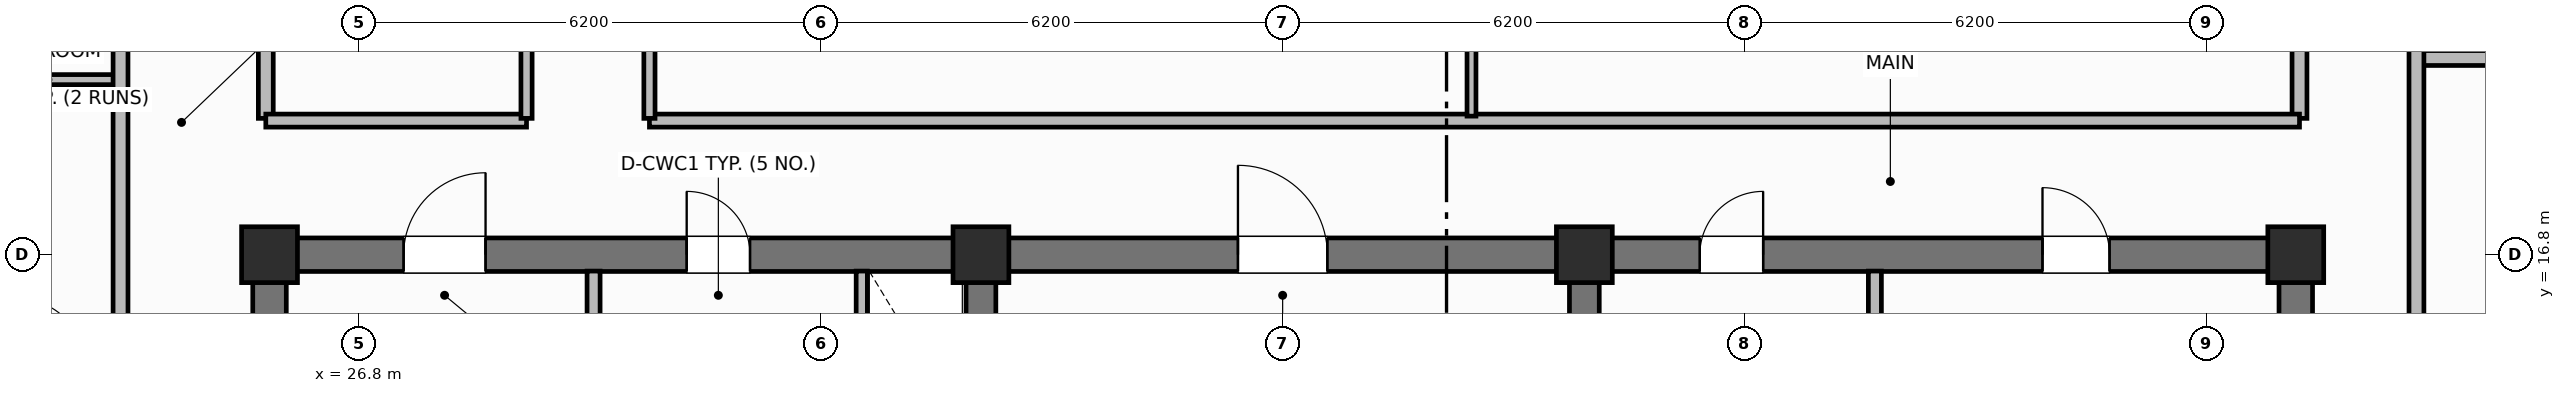
"""IFC4 building model, lengths in metres.
Left out: names, types, materials, properties, quantities, classifications, styles, units other than length and angle.
Written with IfcOpenShell. Run it as: python <this file> out.ifc"""

import sys

from ifc_helpers import new_model, si_unit, direction, frame, frame_2d, origin, origin_2d, place, context, subcontext, project, spatial, rectangle, extrude, element, fill, save


model = new_model("IFC4")
c1 = context("Model", 3, precision=1e-05, world=origin(), true_north=direction((0.0, 1.0)))
c2 = subcontext(c1, "Body", "Model", "MODEL_VIEW")
j1 = project(units=[si_unit("LENGTHUNIT", "METRE"), si_unit("PLANEANGLEUNIT", "RADIAN")], contexts=[c1])
p1 = place(None, origin())
s1 = spatial("IfcSite", under=j1, at=p1, CompositionType="ELEMENT")
p2 = place(p1, origin())
s2 = spatial("IfcBuilding", under=s1, at=p2, CompositionType="ELEMENT")
p3 = place(p2, frame((0.0, 0.0, 275.0)))
s3 = spatial("IfcBuildingStorey", under=s2, at=p3, CompositionType="ELEMENT", Elevation=275.0)
for number, where, z_axis, x_axis in (
    (1, (25.6, 10.825, 0.0), (0.0, 0.0, 1.0), (0.0, 1.0, 0.0)),
    (2, (52.8, 10.825, 0.0), (0.0, 0.0, 1.0), (0.0, 1.0, 0.0)),
):
    element("IfcWall", number, at=place(p3, frame(where, z_axis=z_axis, x_axis=x_axis)), inside=s3, PredefinedType="SHEAR", context=c2, shape_type="SweptSolid", body=[
        extrude(rectangle(XDim=5.75, YDim=0.45, at=frame_2d((2.875, 0.0))), origin(), (0.0, 0.0, 1.0), 3.7),
    ])
p4 = place(p3, frame((25.6, 16.8, 0.0), z_axis=(0.0, 0.0, 1.0), x_axis=(1.0, 0.0, 0.0)))
e3 = element("IfcWall", 3, at=p4, inside=s3, PredefinedType="SHEAR", context=c2, shape_type="SweptSolid", body=[
    extrude(rectangle(XDim=27.2, YDim=0.45, at=frame_2d((13.6, 0.0))), origin(), (0.0, 0.0, 1.0), 3.7),
])
p5 = place(p4, frame((1.8, 0.0, 0.0)))
e4 = element("IfcOpeningElement", 4, at=p5, cuts=e3, PredefinedType="OPENING", context=c2, shape_type="SweptSolid", body=[
    extrude(rectangle(XDim=1.1, YDim=2.15, at=frame_2d((0.55, 1.075))), frame((0.0, 0.235, 0.0), z_axis=(0.0, -1.0, 0.0), x_axis=(1.0, 0.0, 0.0)), (0.0, 0.0, 1.0), 0.47),
])
p6 = place(p4, frame((5.6, 0.0, 0.0)))
e5 = element("IfcOpeningElement", 5, at=p6, cuts=e3, PredefinedType="OPENING", context=c2, shape_type="SweptSolid", body=[
    extrude(rectangle(XDim=0.85, YDim=2.1, at=frame_2d((0.425, 1.05))), frame((0.0, 0.235, 0.0), z_axis=(0.0, -1.0, 0.0), x_axis=(1.0, 0.0, 0.0)), (0.0, 0.0, 1.0), 0.47),
])
p7 = place(p4, frame((13.0, 0.0, 0.0)))
e6 = element("IfcOpeningElement", 6, at=p7, cuts=e3, PredefinedType="OPENING", context=c2, shape_type="SweptSolid", body=[
    extrude(rectangle(XDim=1.2, YDim=2.15, at=frame_2d((0.6, 1.075))), frame((0.0, 0.235, 0.0), z_axis=(0.0, -1.0, 0.0), x_axis=(1.0, 0.0, 0.0)), (0.0, 0.0, 1.0), 0.47),
])
p8 = place(p4, frame((19.2, 0.0, 0.0)))
e7 = element("IfcOpeningElement", 7, at=p8, cuts=e3, PredefinedType="OPENING", context=c2, shape_type="SweptSolid", body=[
    extrude(rectangle(XDim=0.85, YDim=2.1, at=frame_2d((0.425, 1.05))), frame((0.0, 0.235, 0.0), z_axis=(0.0, -1.0, 0.0), x_axis=(1.0, 0.0, 0.0)), (0.0, 0.0, 1.0), 0.47),
])
p9 = place(p4, frame((23.8, 0.0, 0.0)))
e8 = element("IfcOpeningElement", 8, at=p9, cuts=e3, PredefinedType="OPENING", context=c2, shape_type="SweptSolid", body=[
    extrude(rectangle(XDim=0.9, YDim=2.1, at=frame_2d((0.45, 1.05))), frame((0.0, 0.235, 0.0), z_axis=(0.0, -1.0, 0.0), x_axis=(1.0, 0.0, 0.0)), (0.0, 0.0, 1.0), 0.47),
])
for number, where, z_axis, x_axis in (
    (9, (35.15, 10.825, 0.0), (0.0, 0.0, 1.0), (0.0, 1.0, 0.0)),
    (10, (43.25, 10.825, 0.0), (0.0, 0.0, 1.0), (0.0, 1.0, 0.0)),
):
    element("IfcWall", number, at=place(p3, frame(where, z_axis=z_axis, x_axis=x_axis)), inside=s3, PredefinedType="SHEAR", context=c2, shape_type="SweptSolid", body=[
        extrude(rectangle(XDim=5.75, YDim=0.4, at=frame_2d((2.875, 0.0))), origin(), (0.0, 0.0, 1.0), 3.7),
    ])
for number, where, z_axis, x_axis in (
    (11, (25.6, 16.8, 0.0), (0.0, 0.0, 1.0), (1.0, 0.0, 0.0)),
    (12, (35.15, 16.8, 0.0), (0.0, 0.0, 1.0), (1.0, 0.0, 0.0)),
    (13, (43.25, 16.8, 0.0), (0.0, 0.0, 1.0), (1.0, 0.0, 0.0)),
    (14, (52.8, 16.8, 0.0), (0.0, 0.0, 1.0), (1.0, 0.0, 0.0)),
):
    element("IfcColumn", number, at=place(p3, frame(where, z_axis=z_axis, x_axis=x_axis)), inside=s3, PredefinedType="COLUMN", context=c2, shape_type="SweptSolid", body=[
        extrude(rectangle(XDim=0.75, YDim=0.75, at=origin_2d()), origin(), (0.0, 0.0, 1.0), 3.7),
    ])
p10 = place(p3, frame((29.95, 14.5, 0.0), z_axis=(0.0, 0.0, 1.0), x_axis=(0.0, 1.0, 0.0)))
e15 = element("IfcWall", 15, at=p10, inside=s3, PredefinedType="PARTITIONING", context=c2, shape_type="SweptSolid", body=[
    extrude(rectangle(XDim=2.08, YDim=0.175, at=frame_2d((1.04, 0.0))), origin(), (0.0, 0.0, 1.0), 2.56),
])
p11 = place(p3, frame((33.55, 14.5, 0.0), z_axis=(0.0, 0.0, 1.0), x_axis=(0.0, 1.0, 0.0)))
e16 = element("IfcWall", 16, at=p11, inside=s3, PredefinedType="PARTITIONING", context=c2, shape_type="SweptSolid", body=[
    extrude(rectangle(XDim=2.08, YDim=0.15, at=frame_2d((1.04, 0.0))), origin(), (0.0, 0.0, 1.0), 2.56),
])
p12 = place(p11, frame((0.55, 0.0, 0.0)))
e17 = element("IfcOpeningElement", 17, at=p12, cuts=e16, PredefinedType="OPENING", context=c2, shape_type="SweptSolid", body=[
    extrude(rectangle(XDim=0.85, YDim=2.05, at=frame_2d((0.425, 1.025))), frame((0.0, 0.085, 0.0), z_axis=(0.0, -1.0, 0.0), x_axis=(1.0, 0.0, 0.0)), (0.0, 0.0, 1.0), 0.17),
])
p13 = place(p3, frame((47.15, 10.95, 0.0), z_axis=(0.0, 0.0, 1.0), x_axis=(0.0, 1.0, 0.0)))
e18 = element("IfcWall", 18, at=p13, inside=s3, PredefinedType="PARTITIONING", context=c2, shape_type="SweptSolid", body=[
    extrude(rectangle(XDim=5.63, YDim=0.175, at=frame_2d((2.815, 0.0))), origin(), (0.0, 0.0, 1.0), 2.56),
])
for number, where, z_axis, x_axis in (
    (19, (25.55, 18.63, 0.0), (0.0, 0.0, 1.0), (0.0, 1.0, 0.0)),
    (20, (52.85, 18.63, 0.0), (0.0, 0.0, 1.0), (0.0, 1.0, 0.0)),
):
    element("IfcWall", number, at=place(p3, frame(where, z_axis=z_axis, x_axis=x_axis)), inside=s3, PredefinedType="PARTITIONING", context=c2, shape_type="SweptSolid", body=[
        extrude(rectangle(XDim=19.14, YDim=0.2, at=frame_2d((9.57, 0.0))), origin(), (0.0, 0.0, 1.0), 2.56),
    ])
p14 = place(p3, frame((25.55, 18.6, 0.0), z_axis=(0.0, 0.0, 1.0), x_axis=(1.0, 0.0, 0.0)))
e21 = element("IfcWall", 21, at=p14, inside=s3, PredefinedType="PARTITIONING", context=c2, shape_type="SweptSolid", body=[
    extrude(rectangle(XDim=3.5, YDim=0.175, at=frame_2d((1.75, 0.0))), origin(), (0.0, 0.0, 1.0), 2.56),
])
p15 = place(p3, frame((30.7, 18.6, 0.0), z_axis=(0.0, 0.0, 1.0), x_axis=(1.0, 0.0, 0.0)))
e22 = element("IfcWall", 22, at=p15, inside=s3, PredefinedType="PARTITIONING", context=c2, shape_type="SweptSolid", body=[
    extrude(rectangle(XDim=22.15, YDim=0.175, at=frame_2d((11.075, 0.0))), origin(), (0.0, 0.0, 1.0), 2.56),
])
p16 = place(p3, frame((41.735, 18.66, 0.0), z_axis=(0.0, 0.0, 1.0), x_axis=(0.0, 1.0, 0.0)))
e23 = element("IfcWall", 23, at=p16, inside=s3, PredefinedType="PARTITIONING", context=c2, shape_type="SweptSolid", body=[
    extrude(rectangle(XDim=10.648, YDim=0.12, at=frame_2d((5.324, 0.0))), origin(), (0.0, 0.0, 1.0), 2.56),
])
p17 = place(p16, frame((2.0, 0.0, 0.0)))
e24 = element("IfcOpeningElement", 24, at=p17, cuts=e23, PredefinedType="OPENING", context=c2, shape_type="SweptSolid", body=[
    extrude(rectangle(XDim=0.9, YDim=2.1, at=frame_2d((0.45, 1.05))), frame((0.0, 0.07, 0.0), z_axis=(0.0, -1.0, 0.0), x_axis=(1.0, 0.0, 0.0)), (0.0, 0.0, 1.0), 0.14),
])
p18 = place(p3, frame((29.05, 18.63, 0.0), z_axis=(0.0, 0.0, 1.0), x_axis=(0.0, 1.0, 0.0)))
e25 = element("IfcWall", 25, at=p18, inside=s3, PredefinedType="PARTITIONING", context=c2, shape_type="SweptSolid", body=[
    extrude(rectangle(XDim=19.14, YDim=0.15, at=frame_2d((9.57, 0.0))), origin(), (0.0, 0.0, 1.0), 2.56),
])
p19 = place(p18, frame((5.5, 0.0, 0.0)))
e26 = element("IfcOpeningElement", 26, at=p19, cuts=e25, PredefinedType="OPENING", context=c2, shape_type="SweptSolid", body=[
    extrude(rectangle(XDim=1.0, YDim=2.15, at=frame_2d((0.5, 1.075))), frame((0.0, 0.085, 0.0), z_axis=(0.0, -1.0, 0.0), x_axis=(1.0, 0.0, 0.0)), (0.0, 0.0, 1.0), 0.17),
])
p20 = place(p3, frame((30.7, 18.63, 0.0), z_axis=(0.0, 0.0, 1.0), x_axis=(0.0, 1.0, 0.0)))
e27 = element("IfcWall", 27, at=p20, inside=s3, PredefinedType="PARTITIONING", context=c2, shape_type="SweptSolid", body=[
    extrude(rectangle(XDim=19.14, YDim=0.15, at=frame_2d((9.57, 0.0))), origin(), (0.0, 0.0, 1.0), 2.56),
])
p21 = place(p20, frame((2.2, 0.0, 0.0)))
e28 = element("IfcOpeningElement", 28, at=p21, cuts=e27, PredefinedType="OPENING", context=c2, shape_type="SweptSolid", body=[
    extrude(rectangle(XDim=1.0, YDim=2.15, at=frame_2d((0.5, 1.075))), frame((0.0, 0.085, 0.0), z_axis=(0.0, -1.0, 0.0), x_axis=(1.0, 0.0, 0.0)), (0.0, 0.0, 1.0), 0.17),
])
p22 = place(p20, frame((12.719, 0.0, 0.0)))
e29 = element("IfcOpeningElement", 29, at=p22, cuts=e27, PredefinedType="OPENING", context=c2, shape_type="SweptSolid", body=[
    extrude(rectangle(XDim=1.0, YDim=2.15, at=frame_2d((0.5, 1.075))), frame((0.0, 0.085, 0.0), z_axis=(0.0, -1.0, 0.0), x_axis=(1.0, 0.0, 0.0)), (0.0, 0.0, 1.0), 0.17),
])
p23 = place(p3, frame((21.65, 19.15, 0.0), z_axis=(0.0, 0.0, 1.0), x_axis=(1.0, 0.0, 0.0)))
e30 = element("IfcWall", 30, at=p23, inside=s3, PredefinedType="PARTITIONING", context=c2, shape_type="SweptSolid", body=[
    extrude(rectangle(XDim=1.95, YDim=0.135, at=frame_2d((0.975, 0.0))), origin(), (0.0, 0.0, 1.0), 2.56),
])
p24 = place(p3, frame((23.6, 9.95, 0.0), z_axis=(0.0, 0.0, 1.0), x_axis=(0.0, 1.0, 0.0)))
e31 = element("IfcWall", 31, at=p24, inside=s3, PredefinedType="PARTITIONING", context=c2, shape_type="SweptSolid", body=[
    extrude(rectangle(XDim=36.5, YDim=0.2, at=frame_2d((18.25, 0.0))), origin(), (0.0, 0.0, 1.0), 2.56),
])
p25 = place(p24, frame((3.25, 0.0, 0.0)))
e32 = element("IfcOpeningElement", 32, at=p25, cuts=e31, PredefinedType="OPENING", context=c2, shape_type="SweptSolid", body=[
    extrude(rectangle(XDim=1.0, YDim=2.15, at=frame_2d((0.5, 1.075))), frame((0.0, 0.11, 0.0), z_axis=(0.0, -1.0, 0.0), x_axis=(1.0, 0.0, 0.0)), (0.0, 0.0, 1.0), 0.22),
])
p26 = place(p3, frame((54.42, 19.44, 0.0), z_axis=(0.0, 0.0, 1.0), x_axis=(1.0, 0.0, 0.0)))
e33 = element("IfcWall", 33, at=p26, inside=s3, PredefinedType="PARTITIONING", context=c2, shape_type="SweptSolid", body=[
    extrude(rectangle(XDim=4.45, YDim=0.2, at=frame_2d((2.225, 0.0))), origin(), (0.0, 0.0, 1.0), 2.56),
])
p27 = place(p3, frame((54.42, 9.95, 0.0), z_axis=(0.0, 0.0, 1.0), x_axis=(0.0, 1.0, 0.0)))
e34 = element("IfcWall", 34, at=p27, inside=s3, PredefinedType="PARTITIONING", context=c2, shape_type="SweptSolid", body=[
    extrude(rectangle(XDim=36.5, YDim=0.2, at=frame_2d((18.25, 0.0))), origin(), (0.0, 0.0, 1.0), 2.56),
])
p28 = place(p27, frame((3.11, 0.0, 0.0)))
e35 = element("IfcOpeningElement", 35, at=p28, cuts=e34, PredefinedType="OPENING", context=c2, shape_type="SweptSolid", body=[
    extrude(rectangle(XDim=1.0, YDim=2.15, at=frame_2d((0.5, 1.075))), frame((0.0, 0.11, 0.0), z_axis=(0.0, -1.0, 0.0), x_axis=(1.0, 0.0, 0.0)), (0.0, 0.0, 1.0), 0.22),
])
p29 = place(p27, frame((11.99, 0.0, 0.0)))
e36 = element("IfcOpeningElement", 36, at=p29, cuts=e34, PredefinedType="OPENING", context=c2, shape_type="SweptSolid", body=[
    extrude(rectangle(XDim=1.0, YDim=2.15, at=frame_2d((0.5, 1.075))), frame((0.0, 0.11, 0.0), z_axis=(0.0, -1.0, 0.0), x_axis=(1.0, 0.0, 0.0)), (0.0, 0.0, 1.0), 0.22),
])
p30 = place(p27, frame((23.5, 0.0, 0.0)))
e37 = element("IfcOpeningElement", 37, at=p30, cuts=e34, PredefinedType="OPENING", context=c2, shape_type="SweptSolid", body=[
    extrude(rectangle(XDim=1.0, YDim=2.15, at=frame_2d((0.5, 1.075))), frame((0.0, 0.11, 0.0), z_axis=(0.0, -1.0, 0.0), x_axis=(1.0, 0.0, 0.0)), (0.0, 0.0, 1.0), 0.22),
])
p31 = place(p27, frame((31.2, 0.0, 0.0)))
e38 = element("IfcOpeningElement", 38, at=p31, cuts=e34, PredefinedType="OPENING", context=c2, shape_type="SweptSolid", body=[
    extrude(rectangle(XDim=1.0, YDim=2.15, at=frame_2d((0.5, 1.075))), frame((0.0, 0.11, 0.0), z_axis=(0.0, -1.0, 0.0), x_axis=(1.0, 0.0, 0.0)), (0.0, 0.0, 1.0), 0.22),
])
p32 = place(p5, origin())
e39 = element("IfcDoor", 39, at=p32, inside=s3, OperationType="SINGLE_SWING_RIGHT", PredefinedType="DOOR", context=c2, shape_type="SweptSolid", body=[
    extrude(rectangle(XDim=1.1, YDim=2.15, at=frame_2d((0.55, 1.075))), frame((0.0, 0.025, 0.0), z_axis=(0.0, -1.0, 0.0), x_axis=(1.0, 0.0, 0.0)), (0.0, 0.0, 1.0), 0.05),
])
fill(e4, e39)
p33 = place(p6, origin())
e40 = element("IfcDoor", 40, at=p33, inside=s3, OperationType="SINGLE_SWING_LEFT", PredefinedType="DOOR", context=c2, shape_type="SweptSolid", body=[
    extrude(rectangle(XDim=0.85, YDim=2.1, at=frame_2d((0.425, 1.05))), frame((0.0, 0.025, 0.0), z_axis=(0.0, -1.0, 0.0), x_axis=(1.0, 0.0, 0.0)), (0.0, 0.0, 1.0), 0.05),
])
fill(e5, e40)
p34 = place(p7, origin())
e41 = element("IfcDoor", 41, at=p34, inside=s3, OperationType="SINGLE_SWING_LEFT", PredefinedType="DOOR", context=c2, shape_type="SweptSolid", body=[
    extrude(rectangle(XDim=1.2, YDim=2.15, at=frame_2d((0.6, 1.075))), frame((0.0, 0.025, 0.0), z_axis=(0.0, -1.0, 0.0), x_axis=(1.0, 0.0, 0.0)), (0.0, 0.0, 1.0), 0.05),
])
fill(e6, e41)
p35 = place(p8, origin())
e42 = element("IfcDoor", 42, at=p35, inside=s3, OperationType="SINGLE_SWING_RIGHT", PredefinedType="DOOR", context=c2, shape_type="SweptSolid", body=[
    extrude(rectangle(XDim=0.85, YDim=2.1, at=frame_2d((0.425, 1.05))), frame((0.0, 0.025, 0.0), z_axis=(0.0, -1.0, 0.0), x_axis=(1.0, 0.0, 0.0)), (0.0, 0.0, 1.0), 0.05),
])
fill(e7, e42)
p36 = place(p9, origin())
e43 = element("IfcDoor", 43, at=p36, inside=s3, OperationType="SINGLE_SWING_LEFT", PredefinedType="DOOR", context=c2, shape_type="SweptSolid", body=[
    extrude(rectangle(XDim=0.9, YDim=2.1, at=frame_2d((0.45, 1.05))), frame((0.0, 0.025, 0.0), z_axis=(0.0, -1.0, 0.0), x_axis=(1.0, 0.0, 0.0)), (0.0, 0.0, 1.0), 0.05),
])
fill(e8, e43)
save(model, sys.argv[1])
